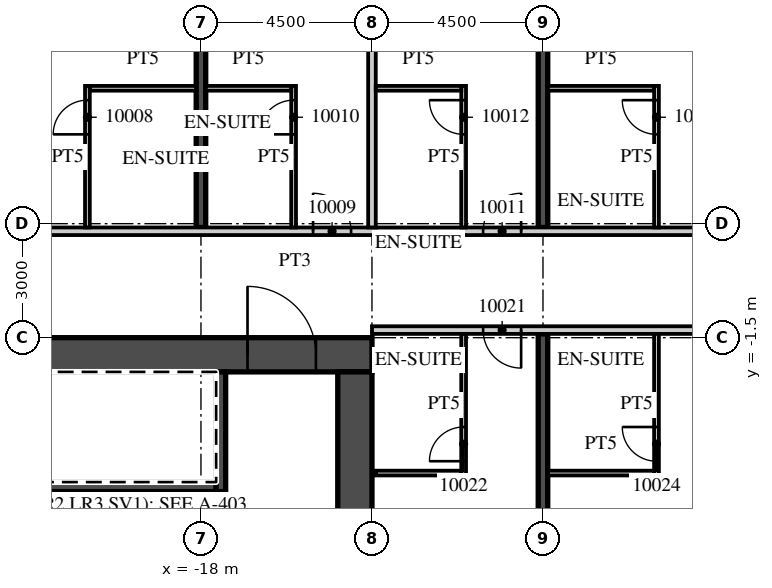
"""IFC4 building model, lengths in metres.
Left out: names, types, materials, properties, quantities, classifications, styles, units other than length and angle.
Written with IfcOpenShell. Run it as: python <this file> out.ifc"""

import sys

from ifc_helpers import new_model, si_unit, direction, frame, frame_2d, origin, place, context, subcontext, project, spatial, rectangle, extrude, element, fill, save


model = new_model("IFC4")
c1 = context("Model", 3, precision=1e-05, world=origin(), true_north=direction((0.0, 1.0)))
c2 = subcontext(c1, "Body", "Model", "MODEL_VIEW")
j1 = project(units=[si_unit("LENGTHUNIT", "METRE"), si_unit("PLANEANGLEUNIT", "RADIAN")], contexts=[c1])
p1 = place(None, origin())
s1 = spatial("IfcSite", under=j1, at=p1, CompositionType="ELEMENT")
p2 = place(p1, origin())
s2 = spatial("IfcBuilding", under=s1, at=p2, CompositionType="ELEMENT")
p3 = place(p2, frame((0.0, 0.0, 63.3)))
s3 = spatial("IfcBuildingStorey", under=s2, at=p3, CompositionType="ELEMENT", Elevation=63.3)
for number, where, z_axis, x_axis in (
    (1, (-18.0, 1.4, 0.0), (0.0, 0.0, 1.0), (0.0, 1.0, 0.0)),
    (2, (-9.0, -21.54, 0.0), (0.0, 0.0, 1.0), (0.0, 1.0, 0.0)),
    (3, (-9.0, 1.4, 0.0), (0.0, 0.0, 1.0), (0.0, 1.0, 0.0)),
):
    element("IfcWall", number, at=place(p3, frame(where, z_axis=z_axis, x_axis=x_axis)), inside=s3, PredefinedType="SHEAR", context=c2, shape_type="SweptSolid", body=[
        extrude(rectangle(XDim=20.14, YDim=0.25, at=frame_2d((10.07, 0.0))), origin(), (0.0, 0.0, 1.0), 3.3),
    ])
p4 = place(p3, frame((-44.55, 1.3, 0.0), z_axis=(0.0, 0.0, 1.0), x_axis=(1.0, 0.0, 0.0)))
e4 = element("IfcWall", 4, at=p4, inside=s3, PredefinedType="PARTITIONING", context=c2, shape_type="SweptSolid", body=[
    extrude(rectangle(XDim=58.05, YDim=0.2, at=frame_2d((29.025, 0.0))), origin(), (0.0, 0.0, 1.0), 3.02),
])
p5 = place(p4, frame((0.525, 0.0, 0.0)))
e5 = element("IfcOpeningElement", 5, at=p5, cuts=e4, PredefinedType="OPENING", context=c2, shape_type="SweptSolid", body=[
    extrude(rectangle(XDim=1.0, YDim=2.1, at=frame_2d((0.5, 1.05))), frame((0.0, 0.11, 0.0), z_axis=(0.0, -1.0, 0.0), x_axis=(1.0, 0.0, 0.0)), (0.0, 0.0, 1.0), 0.22),
])
p6 = place(p4, frame((6.975, 0.0, 0.0)))
e6 = element("IfcOpeningElement", 6, at=p6, cuts=e4, PredefinedType="OPENING", context=c2, shape_type="SweptSolid", body=[
    extrude(rectangle(XDim=1.0, YDim=2.1, at=frame_2d((0.5, 1.05))), frame((0.0, 0.11, 0.0), z_axis=(0.0, -1.0, 0.0), x_axis=(1.0, 0.0, 0.0)), (0.0, 0.0, 1.0), 0.22),
])
p7 = place(p4, frame((10.987, 0.0, 0.0)))
e7 = element("IfcOpeningElement", 7, at=p7, cuts=e4, PredefinedType="OPENING", context=c2, shape_type="SweptSolid", body=[
    extrude(rectangle(XDim=1.2, YDim=2.1, at=frame_2d((0.6, 1.05))), frame((0.0, 0.11, 0.0), z_axis=(0.0, -1.0, 0.0), x_axis=(1.0, 0.0, 0.0)), (0.0, 0.0, 1.0), 0.22),
])
p8 = place(p4, frame((19.987, 0.0, 0.0)))
e8 = element("IfcOpeningElement", 8, at=p8, cuts=e4, PredefinedType="OPENING", context=c2, shape_type="SweptSolid", body=[
    extrude(rectangle(XDim=1.2, YDim=2.1, at=frame_2d((0.6, 1.05))), frame((0.0, 0.11, 0.0), z_axis=(0.0, -1.0, 0.0), x_axis=(1.0, 0.0, 0.0)), (0.0, 0.0, 1.0), 0.22),
])
p9 = place(p4, frame((29.5, 0.0, 0.0)))
e9 = element("IfcOpeningElement", 9, at=p9, cuts=e4, PredefinedType="OPENING", context=c2, shape_type="SweptSolid", body=[
    extrude(rectangle(XDim=1.0, YDim=2.1, at=frame_2d((0.5, 1.05))), frame((0.0, 0.11, 0.0), z_axis=(0.0, -1.0, 0.0), x_axis=(1.0, 0.0, 0.0)), (0.0, 0.0, 1.0), 0.22),
])
p10 = place(p4, frame((33.975, 0.0, 0.0)))
e10 = element("IfcOpeningElement", 10, at=p10, cuts=e4, PredefinedType="OPENING", context=c2, shape_type="SweptSolid", body=[
    extrude(rectangle(XDim=1.0, YDim=2.1, at=frame_2d((0.5, 1.05))), frame((0.0, 0.11, 0.0), z_axis=(0.0, -1.0, 0.0), x_axis=(1.0, 0.0, 0.0)), (0.0, 0.0, 1.0), 0.22),
])
p11 = place(p4, frame((40.912, 0.0, 0.0)))
e11 = element("IfcOpeningElement", 11, at=p11, cuts=e4, PredefinedType="OPENING", context=c2, shape_type="SweptSolid", body=[
    extrude(rectangle(XDim=1.2, YDim=2.1, at=frame_2d((0.6, 1.05))), frame((0.0, 0.11, 0.0), z_axis=(0.0, -1.0, 0.0), x_axis=(1.0, 0.0, 0.0)), (0.0, 0.0, 1.0), 0.22),
])
p12 = place(p4, frame((47.5, 0.0, 0.0)))
e12 = element("IfcOpeningElement", 12, at=p12, cuts=e4, PredefinedType="OPENING", context=c2, shape_type="SweptSolid", body=[
    extrude(rectangle(XDim=1.0, YDim=2.1, at=frame_2d((0.5, 1.05))), frame((0.0, 0.11, 0.0), z_axis=(0.0, -1.0, 0.0), x_axis=(1.0, 0.0, 0.0)), (0.0, 0.0, 1.0), 0.22),
])
p13 = place(p4, frame((51.975, 0.0, 0.0)))
e13 = element("IfcOpeningElement", 13, at=p13, cuts=e4, PredefinedType="OPENING", context=c2, shape_type="SweptSolid", body=[
    extrude(rectangle(XDim=1.0, YDim=2.1, at=frame_2d((0.5, 1.05))), frame((0.0, 0.11, 0.0), z_axis=(0.0, -1.0, 0.0), x_axis=(1.0, 0.0, 0.0)), (0.0, 0.0, 1.0), 0.22),
])
p14 = place(p4, frame((56.475, 0.0, 0.0)))
e14 = element("IfcOpeningElement", 14, at=p14, cuts=e4, PredefinedType="OPENING", context=c2, shape_type="SweptSolid", body=[
    extrude(rectangle(XDim=1.0, YDim=2.1, at=frame_2d((0.5, 1.05))), frame((0.0, 0.11, 0.0), z_axis=(0.0, -1.0, 0.0), x_axis=(1.0, 0.0, 0.0)), (0.0, 0.0, 1.0), 0.22),
])
p15 = place(p3, frame((-20.988, 1.4, 0.0), z_axis=(0.0, 0.0, 1.0), x_axis=(0.0, 1.0, 0.0)))
e15 = element("IfcWall", 15, at=p15, inside=s3, PredefinedType="PARTITIONING", context=c2, shape_type="SweptSolid", body=[
    extrude(rectangle(XDim=3.725, YDim=0.125, at=frame_2d((1.863, 0.0))), origin(), (0.0, 0.0, 1.0), 3.02),
])
p16 = place(p15, frame((2.45, 0.0, 0.0)))
e16 = element("IfcOpeningElement", 16, at=p16, cuts=e15, PredefinedType="OPENING", context=c2, shape_type="SweptSolid", body=[
    extrude(rectangle(XDim=0.9, YDim=2.1, at=frame_2d((0.45, 1.05))), frame((0.0, 0.073, 0.0), z_axis=(0.0, -1.0, 0.0), x_axis=(1.0, 0.0, 0.0)), (0.0, 0.0, 1.0), 0.145),
])
p17 = place(p3, frame((-20.925, 5.062, 0.0), z_axis=(0.0, 0.0, 1.0), x_axis=(1.0, 0.0, 0.0)))
e17 = element("IfcWall", 17, at=p17, inside=s3, PredefinedType="PARTITIONING", context=c2, shape_type="SweptSolid", body=[
    extrude(rectangle(XDim=2.8, YDim=0.125, at=frame_2d((1.4, 0.0))), origin(), (0.0, 0.0, 1.0), 3.02),
])
p18 = place(p3, frame((-13.5, 1.4, 0.0), z_axis=(0.0, 0.0, 1.0), x_axis=(0.0, 1.0, 0.0)))
e18 = element("IfcWall", 18, at=p18, inside=s3, PredefinedType="PARTITIONING", context=c2, shape_type="SweptSolid", body=[
    extrude(rectangle(XDim=20.15, YDim=0.2, at=frame_2d((10.075, 0.0))), origin(), (0.0, 0.0, 1.0), 3.02),
])
p19 = place(p3, frame((-15.562, 1.4, 0.0), z_axis=(0.0, 0.0, 1.0), x_axis=(0.0, 1.0, 0.0)))
e19 = element("IfcWall", 19, at=p19, inside=s3, PredefinedType="PARTITIONING", context=c2, shape_type="SweptSolid", body=[
    extrude(rectangle(XDim=3.725, YDim=0.125, at=frame_2d((1.863, 0.0))), origin(), (0.0, 0.0, 1.0), 3.02),
])
p20 = place(p19, frame((2.45, 0.0, 0.0)))
e20 = element("IfcOpeningElement", 20, at=p20, cuts=e19, PredefinedType="OPENING", context=c2, shape_type="SweptSolid", body=[
    extrude(rectangle(XDim=0.9, YDim=2.1, at=frame_2d((0.45, 1.05))), frame((0.0, 0.073, 0.0), z_axis=(0.0, -1.0, 0.0), x_axis=(1.0, 0.0, 0.0)), (0.0, 0.0, 1.0), 0.145),
])
p21 = place(p3, frame((-17.875, 5.062, 0.0), z_axis=(0.0, 0.0, 1.0), x_axis=(1.0, 0.0, 0.0)))
e21 = element("IfcWall", 21, at=p21, inside=s3, PredefinedType="PARTITIONING", context=c2, shape_type="SweptSolid", body=[
    extrude(rectangle(XDim=2.25, YDim=0.125, at=frame_2d((1.125, 0.0))), origin(), (0.0, 0.0, 1.0), 3.02),
])
p22 = place(p3, frame((-11.088, 1.4, 0.0), z_axis=(0.0, 0.0, 1.0), x_axis=(0.0, 1.0, 0.0)))
e22 = element("IfcWall", 22, at=p22, inside=s3, PredefinedType="PARTITIONING", context=c2, shape_type="SweptSolid", body=[
    extrude(rectangle(XDim=3.725, YDim=0.125, at=frame_2d((1.863, 0.0))), origin(), (0.0, 0.0, 1.0), 3.02),
])
p23 = place(p22, frame((2.45, 0.0, 0.0)))
e23 = element("IfcOpeningElement", 23, at=p23, cuts=e22, PredefinedType="OPENING", context=c2, shape_type="SweptSolid", body=[
    extrude(rectangle(XDim=0.9, YDim=2.1, at=frame_2d((0.45, 1.05))), frame((0.0, 0.073, 0.0), z_axis=(0.0, -1.0, 0.0), x_axis=(1.0, 0.0, 0.0)), (0.0, 0.0, 1.0), 0.145),
])
p24 = place(p3, frame((-13.4, 5.062, 0.0), z_axis=(0.0, 0.0, 1.0), x_axis=(1.0, 0.0, 0.0)))
e24 = element("IfcWall", 24, at=p24, inside=s3, PredefinedType="PARTITIONING", context=c2, shape_type="SweptSolid", body=[
    extrude(rectangle(XDim=2.25, YDim=0.125, at=frame_2d((1.125, 0.0))), origin(), (0.0, 0.0, 1.0), 3.02),
])
p25 = place(p3, frame((-6.013, 1.4, 0.0), z_axis=(0.0, 0.0, 1.0), x_axis=(0.0, 1.0, 0.0)))
e25 = element("IfcWall", 25, at=p25, inside=s3, PredefinedType="PARTITIONING", context=c2, shape_type="SweptSolid", body=[
    extrude(rectangle(XDim=3.725, YDim=0.125, at=frame_2d((1.863, 0.0))), origin(), (0.0, 0.0, 1.0), 3.02),
])
p26 = place(p25, frame((2.45, 0.0, 0.0)))
e26 = element("IfcOpeningElement", 26, at=p26, cuts=e25, PredefinedType="OPENING", context=c2, shape_type="SweptSolid", body=[
    extrude(rectangle(XDim=0.9, YDim=2.1, at=frame_2d((0.45, 1.05))), frame((0.0, 0.073, 0.0), z_axis=(0.0, -1.0, 0.0), x_axis=(1.0, 0.0, 0.0)), (0.0, 0.0, 1.0), 0.145),
])
p27 = place(p3, frame((-8.875, 5.062, 0.0), z_axis=(0.0, 0.0, 1.0), x_axis=(1.0, 0.0, 0.0)))
e27 = element("IfcWall", 27, at=p27, inside=s3, PredefinedType="PARTITIONING", context=c2, shape_type="SweptSolid", body=[
    extrude(rectangle(XDim=2.8, YDim=0.125, at=frame_2d((1.4, 0.0))), origin(), (0.0, 0.0, 1.0), 3.02),
])
p28 = place(p3, frame((-13.5, -1.3, 0.0), z_axis=(0.0, 0.0, 1.0), x_axis=(1.0, 0.0, 0.0)))
e28 = element("IfcWall", 28, at=p28, inside=s3, PredefinedType="PARTITIONING", context=c2, shape_type="SweptSolid", body=[
    extrude(rectangle(XDim=58.05, YDim=0.2, at=frame_2d((29.025, 0.0))), origin(), (0.0, 0.0, 1.0), 3.02),
])
p29 = place(p28, frame((2.925, 0.0, 0.0)))
e29 = element("IfcOpeningElement", 29, at=p29, cuts=e28, PredefinedType="OPENING", context=c2, shape_type="SweptSolid", body=[
    extrude(rectangle(XDim=1.0, YDim=2.1, at=frame_2d((0.5, 1.05))), frame((0.0, 0.11, 0.0), z_axis=(0.0, -1.0, 0.0), x_axis=(1.0, 0.0, 0.0)), (0.0, 0.0, 1.0), 0.22),
])
p30 = place(p28, frame((9.863, 0.0, 0.0)))
e30 = element("IfcOpeningElement", 30, at=p30, cuts=e28, PredefinedType="OPENING", context=c2, shape_type="SweptSolid", body=[
    extrude(rectangle(XDim=1.2, YDim=2.1, at=frame_2d((0.6, 1.05))), frame((0.0, 0.11, 0.0), z_axis=(0.0, -1.0, 0.0), x_axis=(1.0, 0.0, 0.0)), (0.0, 0.0, 1.0), 0.22),
])
p31 = place(p28, frame((16.45, 0.0, 0.0)))
e31 = element("IfcOpeningElement", 31, at=p31, cuts=e28, PredefinedType="OPENING", context=c2, shape_type="SweptSolid", body=[
    extrude(rectangle(XDim=1.0, YDim=2.1, at=frame_2d((0.5, 1.05))), frame((0.0, 0.11, 0.0), z_axis=(0.0, -1.0, 0.0), x_axis=(1.0, 0.0, 0.0)), (0.0, 0.0, 1.0), 0.22),
])
p32 = place(p28, frame((18.55, 0.0, 0.0)))
e32 = element("IfcOpeningElement", 32, at=p32, cuts=e28, PredefinedType="OPENING", context=c2, shape_type="SweptSolid", body=[
    extrude(rectangle(XDim=1.0, YDim=2.1, at=frame_2d((0.5, 1.05))), frame((0.0, 0.11, 0.0), z_axis=(0.0, -1.0, 0.0), x_axis=(1.0, 0.0, 0.0)), (0.0, 0.0, 1.0), 0.22),
])
p33 = place(p28, frame((24.938, 0.0, 0.0)))
e33 = element("IfcOpeningElement", 33, at=p33, cuts=e28, PredefinedType="OPENING", context=c2, shape_type="SweptSolid", body=[
    extrude(rectangle(XDim=1.2, YDim=2.1, at=frame_2d((0.6, 1.05))), frame((0.0, 0.11, 0.0), z_axis=(0.0, -1.0, 0.0), x_axis=(1.0, 0.0, 0.0)), (0.0, 0.0, 1.0), 0.22),
])
p34 = place(p28, frame((33.938, 0.0, 0.0)))
e34 = element("IfcOpeningElement", 34, at=p34, cuts=e28, PredefinedType="OPENING", context=c2, shape_type="SweptSolid", body=[
    extrude(rectangle(XDim=1.2, YDim=2.1, at=frame_2d((0.6, 1.05))), frame((0.0, 0.11, 0.0), z_axis=(0.0, -1.0, 0.0), x_axis=(1.0, 0.0, 0.0)), (0.0, 0.0, 1.0), 0.22),
])
p35 = place(p28, frame((42.938, 0.0, 0.0)))
e35 = element("IfcOpeningElement", 35, at=p35, cuts=e28, PredefinedType="OPENING", context=c2, shape_type="SweptSolid", body=[
    extrude(rectangle(XDim=1.2, YDim=2.1, at=frame_2d((0.6, 1.05))), frame((0.0, 0.11, 0.0), z_axis=(0.0, -1.0, 0.0), x_axis=(1.0, 0.0, 0.0)), (0.0, 0.0, 1.0), 0.22),
])
p36 = place(p28, frame((52.425, 0.0, 0.0)))
e36 = element("IfcOpeningElement", 36, at=p36, cuts=e28, PredefinedType="OPENING", context=c2, shape_type="SweptSolid", body=[
    extrude(rectangle(XDim=1.0, YDim=2.1, at=frame_2d((0.5, 1.05))), frame((0.0, 0.11, 0.0), z_axis=(0.0, -1.0, 0.0), x_axis=(1.0, 0.0, 0.0)), (0.0, 0.0, 1.0), 0.22),
])
p37 = place(p28, frame((56.525, 0.0, 0.0)))
e37 = element("IfcOpeningElement", 37, at=p37, cuts=e28, PredefinedType="OPENING", context=c2, shape_type="SweptSolid", body=[
    extrude(rectangle(XDim=1.0, YDim=2.1, at=frame_2d((0.5, 1.05))), frame((0.0, 0.11, 0.0), z_axis=(0.0, -1.0, 0.0), x_axis=(1.0, 0.0, 0.0)), (0.0, 0.0, 1.0), 0.22),
])
p38 = place(p3, frame((-11.088, -5.125, 0.0), z_axis=(0.0, 0.0, 1.0), x_axis=(0.0, 1.0, 0.0)))
e38 = element("IfcWall", 38, at=p38, inside=s3, PredefinedType="PARTITIONING", context=c2, shape_type="SweptSolid", body=[
    extrude(rectangle(XDim=3.725, YDim=0.125, at=frame_2d((1.863, 0.0))), origin(), (0.0, 0.0, 1.0), 3.02),
])
p39 = place(p38, frame((0.375, 0.0, 0.0)))
e39 = element("IfcOpeningElement", 39, at=p39, cuts=e38, PredefinedType="OPENING", context=c2, shape_type="SweptSolid", body=[
    extrude(rectangle(XDim=0.9, YDim=2.1, at=frame_2d((0.45, 1.05))), frame((0.0, 0.073, 0.0), z_axis=(0.0, -1.0, 0.0), x_axis=(1.0, 0.0, 0.0)), (0.0, 0.0, 1.0), 0.145),
])
p40 = place(p3, frame((-13.4, -5.062, 0.0), z_axis=(0.0, 0.0, 1.0), x_axis=(1.0, 0.0, 0.0)))
e40 = element("IfcWall", 40, at=p40, inside=s3, PredefinedType="PARTITIONING", context=c2, shape_type="SweptSolid", body=[
    extrude(rectangle(XDim=2.25, YDim=0.125, at=frame_2d((1.125, 0.0))), origin(), (0.0, 0.0, 1.0), 3.02),
])
p41 = place(p3, frame((-6.013, -5.125, 0.0), z_axis=(0.0, 0.0, 1.0), x_axis=(0.0, 1.0, 0.0)))
e41 = element("IfcWall", 41, at=p41, inside=s3, PredefinedType="PARTITIONING", context=c2, shape_type="SweptSolid", body=[
    extrude(rectangle(XDim=3.725, YDim=0.125, at=frame_2d((1.863, 0.0))), origin(), (0.0, 0.0, 1.0), 3.02),
])
p42 = place(p41, frame((0.375, 0.0, 0.0)))
e42 = element("IfcOpeningElement", 42, at=p42, cuts=e41, PredefinedType="OPENING", context=c2, shape_type="SweptSolid", body=[
    extrude(rectangle(XDim=0.9, YDim=2.1, at=frame_2d((0.45, 1.05))), frame((0.0, 0.073, 0.0), z_axis=(0.0, -1.0, 0.0), x_axis=(1.0, 0.0, 0.0)), (0.0, 0.0, 1.0), 0.145),
])
p43 = place(p3, frame((-8.875, -5.062, 0.0), z_axis=(0.0, 0.0, 1.0), x_axis=(1.0, 0.0, 0.0)))
e43 = element("IfcWall", 43, at=p43, inside=s3, PredefinedType="PARTITIONING", context=c2, shape_type="SweptSolid", body=[
    extrude(rectangle(XDim=2.8, YDim=0.125, at=frame_2d((1.4, 0.0))), origin(), (0.0, 0.0, 1.0), 3.02),
])
p44 = place(p3, frame((-31.5, -1.95, 0.0), z_axis=(0.0, 0.0, 1.0), x_axis=(1.0, 0.0, 0.0)))
e44 = element("IfcWall", 44, at=p44, inside=s3, PredefinedType="SHEAR", context=c2, shape_type="SweptSolid", body=[
    extrude(rectangle(XDim=18.0, YDim=0.9, at=frame_2d((9.0, 0.0))), origin(), (0.0, 0.0, 1.0), 3.02),
])
p45 = place(p44, frame((14.725, 0.0, 0.0)))
e45 = element("IfcOpeningElement", 45, at=p45, cuts=e44, PredefinedType="OPENING", context=c2, shape_type="SweptSolid", body=[
    extrude(rectangle(XDim=1.8, YDim=2.1, at=frame_2d((0.9, 1.05))), frame((0.0, 0.46, 0.0), z_axis=(0.0, -1.0, 0.0), x_axis=(1.0, 0.0, 0.0)), (0.0, 0.0, 1.0), 0.92),
])
p46 = place(p3, frame((-13.95, -14.6, 0.0), z_axis=(0.0, 0.0, 1.0), x_axis=(0.0, 1.0, 0.0)))
e46 = element("IfcWall", 46, at=p46, inside=s3, PredefinedType="SHEAR", context=c2, shape_type="SweptSolid", body=[
    extrude(rectangle(XDim=12.2, YDim=0.9, at=frame_2d((6.1, 0.0))), origin(), (0.0, 0.0, 1.0), 3.02),
])
p47 = place(p3, frame((-30.6, -5.425, 0.0), z_axis=(0.0, 0.0, 1.0), x_axis=(1.0, 0.0, 0.0)))
e47 = element("IfcWall", 47, at=p47, inside=s3, PredefinedType="SHEAR", context=c2, shape_type="SweptSolid", body=[
    extrude(rectangle(XDim=13.0, YDim=0.25, at=frame_2d((6.5, 0.0))), origin(), (0.0, 0.0, 1.0), 3.02),
])
p48 = place(p3, frame((-17.475, -5.55, 0.0), z_axis=(0.0, 0.0, 1.0), x_axis=(0.0, 1.0, 0.0)))
e48 = element("IfcWall", 48, at=p48, inside=s3, PredefinedType="SHEAR", context=c2, shape_type="SweptSolid", body=[
    extrude(rectangle(XDim=3.15, YDim=0.25, at=frame_2d((1.575, 0.0))), origin(), (0.0, 0.0, 1.0), 3.02),
])
p49 = place(p16, origin())
e49 = element("IfcDoor", 49, at=p49, inside=s3, OperationType="SINGLE_SWING_LEFT", PredefinedType="DOOR", context=c2, shape_type="SweptSolid", body=[
    extrude(rectangle(XDim=0.9, YDim=2.1, at=frame_2d((0.45, 1.05))), frame((0.0, 0.025, 0.0), z_axis=(0.0, -1.0, 0.0), x_axis=(1.0, 0.0, 0.0)), (0.0, 0.0, 1.0), 0.05),
])
fill(e16, e49)
p50 = place(p9, origin())
e50 = element("IfcDoor", 50, at=p50, inside=s3, OperationType="SINGLE_SWING_LEFT", PredefinedType="DOOR", context=c2, shape_type="SweptSolid", body=[
    extrude(rectangle(XDim=1.0, YDim=2.1, at=frame_2d((0.5, 1.05))), frame((0.0, 0.025, 0.0), z_axis=(0.0, -1.0, 0.0), x_axis=(1.0, 0.0, 0.0)), (0.0, 0.0, 1.0), 0.05),
])
fill(e9, e50)
p51 = place(p20, origin())
e51 = element("IfcDoor", 51, at=p51, inside=s3, OperationType="SINGLE_SWING_LEFT", PredefinedType="DOOR", context=c2, shape_type="SweptSolid", body=[
    extrude(rectangle(XDim=0.9, YDim=2.1, at=frame_2d((0.45, 1.05))), frame((0.0, 0.025, 0.0), z_axis=(0.0, -1.0, 0.0), x_axis=(1.0, 0.0, 0.0)), (0.0, 0.0, 1.0), 0.05),
])
fill(e20, e51)
p52 = place(p10, origin())
e52 = element("IfcDoor", 52, at=p52, inside=s3, OperationType="SINGLE_SWING_RIGHT", PredefinedType="DOOR", context=c2, shape_type="SweptSolid", body=[
    extrude(rectangle(XDim=1.0, YDim=2.1, at=frame_2d((0.5, 1.05))), frame((0.0, 0.025, 0.0), z_axis=(0.0, -1.0, 0.0), x_axis=(1.0, 0.0, 0.0)), (0.0, 0.0, 1.0), 0.05),
])
fill(e10, e52)
p53 = place(p23, origin())
e53 = element("IfcDoor", 53, at=p53, inside=s3, OperationType="SINGLE_SWING_RIGHT", PredefinedType="DOOR", context=c2, shape_type="SweptSolid", body=[
    extrude(rectangle(XDim=0.9, YDim=2.1, at=frame_2d((0.45, 1.05))), frame((0.0, 0.025, 0.0), z_axis=(0.0, -1.0, 0.0), x_axis=(1.0, 0.0, 0.0)), (0.0, 0.0, 1.0), 0.05),
])
fill(e23, e53)
p54 = place(p26, origin())
e54 = element("IfcDoor", 54, at=p54, inside=s3, OperationType="SINGLE_SWING_RIGHT", PredefinedType="DOOR", context=c2, shape_type="SweptSolid", body=[
    extrude(rectangle(XDim=0.9, YDim=2.1, at=frame_2d((0.45, 1.05))), frame((0.0, 0.025, 0.0), z_axis=(0.0, -1.0, 0.0), x_axis=(1.0, 0.0, 0.0)), (0.0, 0.0, 1.0), 0.05),
])
fill(e26, e54)
p55 = place(p29, origin())
e55 = element("IfcDoor", 55, at=p55, inside=s3, OperationType="SINGLE_SWING_RIGHT", PredefinedType="DOOR", context=c2, shape_type="SweptSolid", body=[
    extrude(rectangle(XDim=1.0, YDim=2.1, at=frame_2d((0.5, 1.05))), frame((0.0, 0.025, 0.0), z_axis=(0.0, -1.0, 0.0), x_axis=(1.0, 0.0, 0.0)), (0.0, 0.0, 1.0), 0.05),
])
fill(e29, e55)
p56 = place(p39, origin())
e56 = element("IfcDoor", 56, at=p56, inside=s3, OperationType="SINGLE_SWING_LEFT", PredefinedType="DOOR", context=c2, shape_type="SweptSolid", body=[
    extrude(rectangle(XDim=0.9, YDim=2.1, at=frame_2d((0.45, 1.05))), frame((0.0, 0.025, 0.0), z_axis=(0.0, -1.0, 0.0), x_axis=(1.0, 0.0, 0.0)), (0.0, 0.0, 1.0), 0.05),
])
fill(e39, e56)
p57 = place(p42, origin())
e57 = element("IfcDoor", 57, at=p57, inside=s3, OperationType="SINGLE_SWING_RIGHT", PredefinedType="DOOR", context=c2, shape_type="SweptSolid", body=[
    extrude(rectangle(XDim=0.9, YDim=2.1, at=frame_2d((0.45, 1.05))), frame((0.0, 0.025, 0.0), z_axis=(0.0, -1.0, 0.0), x_axis=(1.0, 0.0, 0.0)), (0.0, 0.0, 1.0), 0.05),
])
fill(e42, e57)
p58 = place(p45, origin())
e58 = element("IfcDoor", 58, at=p58, inside=s3, OperationType="DOUBLE_DOOR_DOUBLE_SWING", PredefinedType="DOOR", context=c2, shape_type="SweptSolid", body=[
    extrude(rectangle(XDim=1.8, YDim=2.1, at=frame_2d((0.9, 1.05))), frame((0.0, 0.025, 0.0), z_axis=(0.0, -1.0, 0.0), x_axis=(1.0, 0.0, 0.0)), (0.0, 0.0, 1.0), 0.05),
])
fill(e45, e58)
save(model, sys.argv[1])
